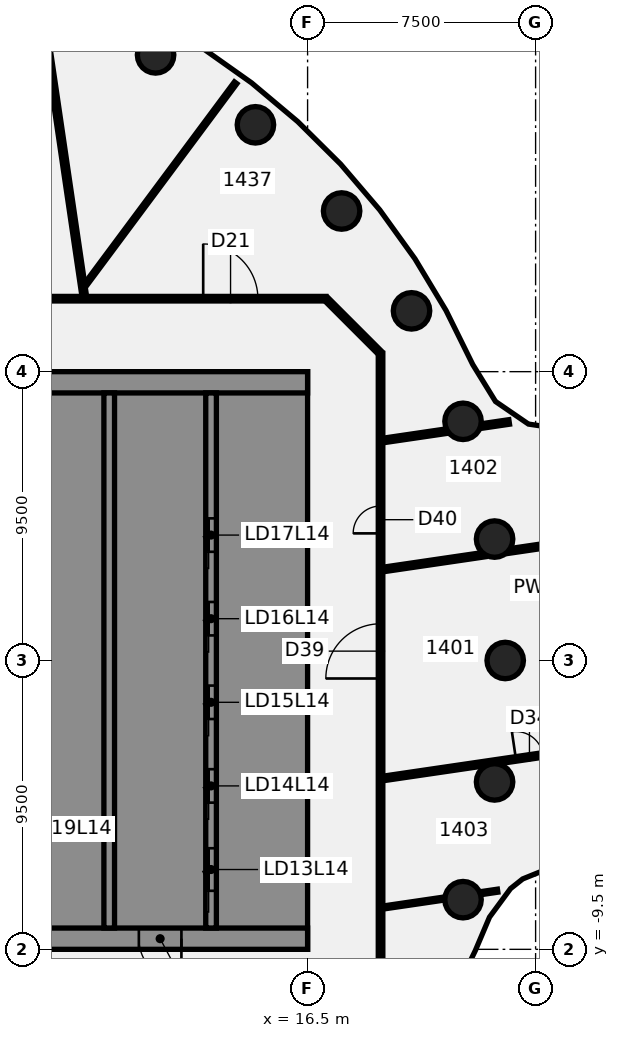
"""IFC4 building model, lengths in metres.
Left out: names, types, materials, properties, quantities, classifications, styles, units other than length and angle.
Written with IfcOpenShell. Run it as: python <this file> out.ifc"""

import sys

from ifc_helpers import new_model, si_unit, direction, frame, frame_2d, origin, origin_2d, place, context, subcontext, project, spatial, polyline, rectangle, circle, outline, extrude, element, fill, save


model = new_model("IFC4")
c1 = context("Model", 3, precision=1e-05, world=origin(), true_north=direction((0.0, 1.0)))
c2 = subcontext(c1, "Body", "Model", "MODEL_VIEW")
j1 = project(units=[si_unit("LENGTHUNIT", "METRE"), si_unit("PLANEANGLEUNIT", "RADIAN")], contexts=[c1])
p1 = place(None, origin())
s1 = spatial("IfcSite", under=j1, at=p1, CompositionType="ELEMENT")
p2 = place(p1, origin())
s2 = spatial("IfcBuilding", under=s1, at=p2, CompositionType="ELEMENT")
p3 = place(p2, frame((0.0, 0.0, 64.0)))
s3 = spatial("IfcBuildingStorey", under=s2, at=p3, CompositionType="ELEMENT", Elevation=64.0)
for number, where, z_axis, x_axis in (
    (1, (23.0, 0.0, -0.14), (0.0, 0.0, 1.0), (1.0, 0.0, 0.0)),
    (2, (22.651, 3.994, -0.14), (0.0, 0.0, 1.0), (1.0, 0.0, 0.0)),
    (3, (21.613, 7.866, -0.14), (0.0, 0.0, 1.0), (1.0, 0.0, 0.0)),
    (4, (19.919, 11.5, -0.14), (0.0, 0.0, 1.0), (1.0, 0.0, 0.0)),
    (5, (17.619, 14.784, -0.14), (0.0, 0.0, 1.0), (1.0, 0.0, 0.0)),
    (6, (14.784, 17.619, -0.14), (0.0, 0.0, 1.0), (1.0, 0.0, 0.0)),
    (7, (11.5, 19.919, -0.14), (0.0, 0.0, 1.0), (1.0, 0.0, 0.0)),
    (8, (21.613, -7.866, -0.14), (0.0, 0.0, 1.0), (1.0, 0.0, 0.0)),
    (9, (22.651, -3.994, -0.14), (0.0, 0.0, 1.0), (1.0, 0.0, 0.0)),
):
    element("IfcColumn", number, at=place(p3, frame(where, z_axis=z_axis, x_axis=x_axis)), inside=s3, PredefinedType="COLUMN", context=c2, shape_type="SweptSolid", body=[
        extrude(circle(Radius=0.6, at=origin_2d()), origin(), (0.0, 0.0, 1.0), 3.75),
    ])
p4 = place(p3, frame((7.826, 21.014, 0.0), z_axis=(0.0, 0.0, 1.0), x_axis=(0.145417104169, -0.989370439125, 0.0)))
e10 = element("IfcWall", 10, at=p4, inside=s3, PredefinedType="PARTITIONING", context=c2, shape_type="SweptSolid", body=[
    extrude(rectangle(XDim=9.142, YDim=0.15, at=frame_2d((4.571, 0.0))), origin(), (0.0, 0.0, 1.0), 3.01),
])
p5 = place(p3, frame((17.128, 11.872, 0.0), z_axis=(0.0, 0.0, 1.0), x_axis=(0.707106781187, -0.707106781187, 0.0)))
e11 = element("IfcWall", 11, at=p5, inside=s3, PredefinedType="PARTITIONING", context=c2, shape_type="SweptSolid", body=[
    extrude(rectangle(XDim=2.465, YDim=0.15, at=frame_2d((1.232, 0.0))), origin(), (0.0, 0.0, 1.0), 3.01),
])
p6 = place(p3, frame((-17.065, 11.9, 0.0), z_axis=(0.0, 0.0, 1.0), x_axis=(1.0, 0.0, 0.0)))
e12 = element("IfcWall", 12, at=p6, inside=s3, PredefinedType="PARTITIONING", context=c2, shape_type="SweptSolid", body=[
    extrude(rectangle(XDim=34.165, YDim=0.15, at=frame_2d((17.083, 0.0))), origin(), (0.0, 0.0, 1.0), 3.01),
])
p7 = place(p6, frame((17.662, 0.0, 0.0)))
e13 = element("IfcOpeningElement", 13, at=p7, cuts=e12, PredefinedType="OPENING", context=c2, shape_type="SweptSolid", body=[
    extrude(rectangle(XDim=1.8, YDim=2.1, at=frame_2d((0.9, 1.05))), frame((0.0, 0.085, 0.0), z_axis=(0.0, -1.0, 0.0), x_axis=(1.0, 0.0, 0.0)), (0.0, 0.0, 1.0), 0.17),
])
p8 = place(p6, frame((30.131, 0.0, 0.0)))
e14 = element("IfcOpeningElement", 14, at=p8, cuts=e12, PredefinedType="OPENING", context=c2, shape_type="SweptSolid", body=[
    extrude(rectangle(XDim=1.8, YDim=2.1, at=frame_2d((0.9, 1.05))), frame((0.0, 0.085, 0.0), z_axis=(0.0, -1.0, 0.0), x_axis=(1.0, 0.0, 0.0)), (0.0, 0.0, 1.0), 0.17),
])
p9 = place(p6, frame((5.116, 0.0, 0.0)))
e15 = element("IfcOpeningElement", 15, at=p9, cuts=e12, PredefinedType="OPENING", context=c2, shape_type="SweptSolid", body=[
    extrude(rectangle(XDim=1.8, YDim=2.1, at=frame_2d((0.9, 1.05))), frame((0.0, 0.085, 0.0), z_axis=(0.0, -1.0, 0.0), x_axis=(1.0, 0.0, 0.0)), (0.0, 0.0, 1.0), 0.17),
])
p10 = place(p3, frame((18.969, 7.234, 0.0), z_axis=(0.0, 0.0, 1.0), x_axis=(0.98937209659, 0.145405826875, 0.0)))
e16 = element("IfcWall", 16, at=p10, inside=s3, PredefinedType="PARTITIONING", context=c2, shape_type="SweptSolid", body=[
    extrude(rectangle(XDim=2.153, YDim=0.15, at=frame_2d((1.076, 0.0))), origin(), (0.0, 0.0, 1.0), 3.01),
])
p11 = place(p3, frame((22.18, 7.706, 0.0), z_axis=(0.0, 0.0, 1.0), x_axis=(0.989393512595, 0.145260033163, 0.0)))
e17 = element("IfcWall", 17, at=p11, inside=s3, PredefinedType="PARTITIONING", context=c2, shape_type="SweptSolid", body=[
    extrude(rectangle(XDim=0.961, YDim=0.15, at=frame_2d((0.481, 0.0))), origin(), (0.0, 0.0, 1.0), 3.01),
])
p12 = place(p3, frame((18.969, -3.882, 0.0), z_axis=(0.0, 0.0, 1.0), x_axis=(0.989370952115, 0.145413613912, 0.0)))
e18 = element("IfcWall", 18, at=p12, inside=s3, PredefinedType="PARTITIONING", context=c2, shape_type="SweptSolid", body=[
    extrude(rectangle(XDim=7.258, YDim=0.15, at=frame_2d((3.629, 0.0))), origin(), (0.0, 0.0, 1.0), 3.01),
])
p13 = place(p12, frame((4.43, 0.0, 0.0)))
e19 = element("IfcOpeningElement", 19, at=p13, cuts=e18, PredefinedType="OPENING", context=c2, shape_type="SweptSolid", body=[
    extrude(rectangle(XDim=0.9, YDim=2.1, at=frame_2d((0.45, 1.05))), frame((0.0, 0.085, 0.0), z_axis=(0.0, -1.0, 0.0), x_axis=(1.0, 0.0, 0.0)), (0.0, 0.0, 1.0), 0.17),
])
p14 = place(p3, frame((18.969, 2.991, 0.0), z_axis=(0.0, 0.0, 1.0), x_axis=(0.989385008204, 0.145317946381, 0.0)))
e20 = element("IfcWall", 20, at=p14, inside=s3, PredefinedType="PARTITIONING", context=c2, shape_type="SweptSolid", body=[
    extrude(rectangle(XDim=3.394, YDim=0.15, at=frame_2d((1.697, 0.0))), origin(), (0.0, 0.0, 1.0), 3.01),
])
p15 = place(p3, frame((23.086, 3.596, 0.0), z_axis=(0.0, 0.0, 1.0), x_axis=(0.98937731598, 0.145370308603, 0.0)))
e21 = element("IfcWall", 21, at=p15, inside=s3, PredefinedType="PARTITIONING", context=c2, shape_type="SweptSolid", body=[
    extrude(rectangle(XDim=2.103, YDim=0.15, at=frame_2d((1.051, 0.0))), origin(), (0.0, 0.0, 1.0), 3.01),
])
p16 = place(p3, frame((18.964, -8.128, 0.0), z_axis=(0.0, 0.0, 1.0), x_axis=(0.989366120347, 0.145446484692, 0.0)))
e22 = element("IfcWall", 22, at=p16, inside=s3, PredefinedType="PARTITIONING", context=c2, shape_type="SweptSolid", body=[
    extrude(rectangle(XDim=2.071, YDim=0.1, at=frame_2d((1.036, 0.0))), origin(), (0.0, 0.0, 1.0), 3.01),
])
p17 = place(p3, frame((22.167, -7.657, 0.0), z_axis=(0.0, 0.0, 1.0), x_axis=(0.98935388362, 0.145529697883, 0.0)))
e23 = element("IfcWall", 23, at=p17, inside=s3, PredefinedType="PARTITIONING", context=c2, shape_type="SweptSolid", body=[
    extrude(rectangle(XDim=0.591, YDim=0.1, at=frame_2d((0.295, 0.0))), origin(), (0.0, 0.0, 1.0), 3.01),
])
p18 = place(p3, frame((9.195, 12.361, 0.0), z_axis=(0.0, 0.0, 1.0), x_axis=(0.596808955644, 0.80238336876, 0.0)))
e24 = element("IfcWall", 24, at=p18, inside=s3, PredefinedType="PARTITIONING", context=c2, shape_type="SweptSolid", body=[
    extrude(rectangle(XDim=8.275, YDim=0.1, at=frame_2d((4.138, 0.0))), origin(), (0.0, 0.0, 1.0), 3.01),
])
p19 = place(p3, frame((18.9, -10.1, 0.0), z_axis=(0.0, 0.0, 1.0), x_axis=(0.0, 1.0, 0.0)))
e25 = element("IfcWall", 25, at=p19, inside=s3, PredefinedType="PARTITIONING", context=c2, shape_type="SweptSolid", body=[
    extrude(rectangle(XDim=20.2, YDim=0.15, at=frame_2d((10.1, 0.0))), origin(), (0.0, 0.0, 1.0), 3.01),
])
p20 = place(p19, frame((9.508, 0.0, 0.0)))
e26 = element("IfcOpeningElement", 26, at=p20, cuts=e25, PredefinedType="OPENING", context=c2, shape_type="SweptSolid", body=[
    extrude(rectangle(XDim=1.8, YDim=2.1, at=frame_2d((0.9, 1.05))), frame((0.0, 0.085, 0.0), z_axis=(0.0, -1.0, 0.0), x_axis=(1.0, 0.0, 0.0)), (0.0, 0.0, 1.0), 0.17),
])
p21 = place(p19, frame((14.281, 0.0, 0.0)))
e27 = element("IfcOpeningElement", 27, at=p21, cuts=e25, PredefinedType="OPENING", context=c2, shape_type="SweptSolid", body=[
    extrude(rectangle(XDim=0.9, YDim=2.1, at=frame_2d((0.45, 1.05))), frame((0.0, 0.085, 0.0), z_axis=(0.0, -1.0, 0.0), x_axis=(1.0, 0.0, 0.0)), (0.0, 0.0, 1.0), 0.17),
])
p22 = place(p3, frame((16.5, -9.15, 0.0), z_axis=(0.0, 0.0, 1.0), x_axis=(-1.0, 0.0, 0.0)))
e28 = element("IfcWall", 28, at=p22, inside=s3, PredefinedType="SHEAR", context=c2, shape_type="SweptSolid", body=[
    extrude(rectangle(XDim=13.0, YDim=0.7, at=frame_2d((6.5, 0.0))), origin(), (0.0, 0.0, 1.0), 3.61),
])
p23 = place(p22, frame((4.15, 0.0, 0.0)))
e29 = element("IfcOpeningElement", 29, at=p23, cuts=e28, PredefinedType="OPENING", context=c2, shape_type="SweptSolid", body=[
    extrude(rectangle(XDim=1.4, YDim=2.1, at=frame_2d((0.7, 1.05))), frame((0.0, 0.36, 0.0), z_axis=(0.0, -1.0, 0.0), x_axis=(1.0, 0.0, 0.0)), (0.0, 0.0, 1.0), 0.72),
])
p24 = place(p22, frame((10.125, 0.0, 0.0)))
e30 = element("IfcOpeningElement", 30, at=p24, cuts=e28, PredefinedType="OPENING", context=c2, shape_type="SweptSolid", body=[
    extrude(rectangle(XDim=1.4, YDim=2.1, at=frame_2d((0.7, 1.05))), frame((0.0, 0.36, 0.0), z_axis=(0.0, -1.0, 0.0), x_axis=(1.0, 0.0, 0.0)), (0.0, 0.0, 1.0), 0.72),
])
p25 = place(p3, origin())
e31 = element("IfcWall", 31, at=p25, inside=s3, PredefinedType="SHEAR", context=c2, shape_type="SweptSolid", body=[
    extrude(outline(polyline([(13.5, -8.8), (15.8, -8.8), (16.5, -8.8), (16.5, 8.8), (15.8, 8.8), (13.5, 8.8), (13.5, 8.125), (15.8, 8.125), (15.8, 5.625), (13.5, 5.625), (13.5, 5.375), (15.8, 5.375), (15.8, 2.875), (13.5, 2.875), (13.5, 2.625), (15.8, 2.625), (15.8, 0.125), (13.5, 0.125), (13.5, -0.125), (15.8, -0.125), (15.8, -2.625), (13.5, -2.625), (13.5, -2.875), (15.8, -2.875), (15.8, -5.375), (13.5, -5.375), (13.5, -5.625), (15.8, -5.625), (15.8, -8.125), (13.5, -8.125), (13.5, -8.8)])), origin(), (0.0, 0.0, 1.0), 3.61),
])
p26 = place(p3, frame((16.5, 9.15, 0.0), z_axis=(0.0, 0.0, 1.0), x_axis=(-1.0, 0.0, 0.0)))
e32 = element("IfcWall", 32, at=p26, inside=s3, PredefinedType="SHEAR", context=c2, shape_type="SweptSolid", body=[
    extrude(rectangle(XDim=13.0, YDim=0.7, at=frame_2d((6.5, 0.0))), origin(), (0.0, 0.0, 1.0), 3.61),
])
p27 = place(p3, origin())
e33 = element("IfcWall", 33, at=p27, inside=s3, PredefinedType="SHEAR", context=c2, shape_type="SweptSolid", body=[
    extrude(outline(polyline([(9.8, -5.375), (7.5, -5.375), (7.5, -2.875), (9.8, -2.875), (9.8, -2.625), (7.5, -2.625), (7.5, -0.125), (9.8, -0.125), (9.8, 0.125), (7.5, 0.125), (7.5, 2.625), (9.8, 2.625), (9.8, 2.875), (7.5, 2.875), (7.5, 5.375), (9.8, 5.375), (9.8, 5.625), (7.5, 5.625), (7.5, 8.125), (9.8, 8.125), (9.8, 8.8), (7.5, 8.8), (7.15, 8.8), (7.15, -5.625), (7.5, -5.625), (9.8, -5.625), (9.8, -5.375)])), origin(), (0.0, 0.0, 1.0), 3.61),
])
p28 = place(p3, origin())
e34 = element("IfcWall", 34, at=p28, inside=s3, PredefinedType="SHEAR", context=c2, shape_type="SweptSolid", body=[
    extrude(outline(polyline([(7.5, -8.125), (7.5, -8.8), (9.8, -8.8), (9.8, -8.125), (9.8, -5.625), (9.55, -5.625), (9.55, -8.125), (7.5, -8.125)])), origin(), (0.0, 0.0, 1.0), 3.61),
])
p29 = place(p3, frame((13.325, -8.8, 0.0), z_axis=(0.0, 0.0, 1.0), x_axis=(0.0, 1.0, 0.0)))
e35 = element("IfcWall", 35, at=p29, inside=s3, PredefinedType="SHEAR", context=c2, shape_type="SweptSolid", body=[
    extrude(rectangle(XDim=17.6, YDim=0.35, at=frame_2d((8.8, 0.0))), origin(), (0.0, 0.0, 1.0), 3.61),
])
p30 = place(p29, frame((1.225, 0.0, 0.0)))
e36 = element("IfcOpeningElement", 36, at=p30, cuts=e35, PredefinedType="OPENING", context=c2, shape_type="SweptSolid", body=[
    extrude(rectangle(XDim=1.4, YDim=2.1, at=frame_2d((0.7, 1.05))), frame((0.0, 0.185, 0.0), z_axis=(0.0, -1.0, 0.0), x_axis=(1.0, 0.0, 0.0)), (0.0, 0.0, 1.0), 0.37),
])
p31 = place(p29, frame((4.125, 0.0, 0.0)))
e37 = element("IfcOpeningElement", 37, at=p31, cuts=e35, PredefinedType="OPENING", context=c2, shape_type="SweptSolid", body=[
    extrude(rectangle(XDim=1.1, YDim=2.1, at=frame_2d((0.55, 1.05))), frame((0.0, 0.185, 0.0), z_axis=(0.0, -1.0, 0.0), x_axis=(1.0, 0.0, 0.0)), (0.0, 0.0, 1.0), 0.37),
])
p32 = place(p29, frame((6.875, 0.0, 0.0)))
e38 = element("IfcOpeningElement", 38, at=p32, cuts=e35, PredefinedType="OPENING", context=c2, shape_type="SweptSolid", body=[
    extrude(rectangle(XDim=1.1, YDim=2.1, at=frame_2d((0.55, 1.05))), frame((0.0, 0.185, 0.0), z_axis=(0.0, -1.0, 0.0), x_axis=(1.0, 0.0, 0.0)), (0.0, 0.0, 1.0), 0.37),
])
p33 = place(p29, frame((9.625, 0.0, 0.0)))
e39 = element("IfcOpeningElement", 39, at=p33, cuts=e35, PredefinedType="OPENING", context=c2, shape_type="SweptSolid", body=[
    extrude(rectangle(XDim=1.1, YDim=2.1, at=frame_2d((0.55, 1.05))), frame((0.0, 0.185, 0.0), z_axis=(0.0, -1.0, 0.0), x_axis=(1.0, 0.0, 0.0)), (0.0, 0.0, 1.0), 0.37),
])
p34 = place(p29, frame((12.375, 0.0, 0.0)))
e40 = element("IfcOpeningElement", 40, at=p34, cuts=e35, PredefinedType="OPENING", context=c2, shape_type="SweptSolid", body=[
    extrude(rectangle(XDim=1.1, YDim=2.1, at=frame_2d((0.55, 1.05))), frame((0.0, 0.185, 0.0), z_axis=(0.0, -1.0, 0.0), x_axis=(1.0, 0.0, 0.0)), (0.0, 0.0, 1.0), 0.37),
])
p35 = place(p3, frame((9.975, -8.8, 0.0), z_axis=(0.0, 0.0, 1.0), x_axis=(0.0, 1.0, 0.0)))
e41 = element("IfcWall", 41, at=p35, inside=s3, PredefinedType="SHEAR", context=c2, shape_type="SweptSolid", body=[
    extrude(rectangle(XDim=17.6, YDim=0.35, at=frame_2d((8.8, 0.0))), origin(), (0.0, 0.0, 1.0), 3.61),
])
p36 = place(p8, origin())
e42 = element("IfcDoor", 42, at=p36, inside=s3, OperationType="DOUBLE_DOOR_SINGLE_SWING", PredefinedType="DOOR", context=c2, shape_type="SweptSolid", body=[
    extrude(rectangle(XDim=1.8, YDim=2.1, at=frame_2d((0.9, 1.05))), frame((0.0, 0.025, 0.0), z_axis=(0.0, -1.0, 0.0), x_axis=(1.0, 0.0, 0.0)), (0.0, 0.0, 1.0), 0.05),
])
fill(e14, e42)
p37 = place(p13, frame((0.9, 0.0, 0.0), z_axis=(0.0, 0.0, 1.0), x_axis=(-1.0, 0.0, 0.0)))
e43 = element("IfcDoor", 43, at=p37, inside=s3, OperationType="SINGLE_SWING_RIGHT", PredefinedType="DOOR", context=c2, shape_type="SweptSolid", body=[
    extrude(rectangle(XDim=0.9, YDim=2.1, at=frame_2d((0.45, 1.05))), frame((0.0, 0.025, 0.0), z_axis=(0.0, -1.0, 0.0), x_axis=(1.0, 0.0, 0.0)), (0.0, 0.0, 1.0), 0.05),
])
fill(e19, e43)
p38 = place(p20, origin())
e44 = element("IfcDoor", 44, at=p38, inside=s3, OperationType="DOUBLE_DOOR_SINGLE_SWING", PredefinedType="DOOR", context=c2, shape_type="SweptSolid", body=[
    extrude(rectangle(XDim=1.8, YDim=2.1, at=frame_2d((0.9, 1.05))), frame((0.0, 0.025, 0.0), z_axis=(0.0, -1.0, 0.0), x_axis=(1.0, 0.0, 0.0)), (0.0, 0.0, 1.0), 0.05),
])
fill(e26, e44)
p39 = place(p21, frame((0.9, 0.0, 0.0), z_axis=(0.0, 0.0, 1.0), x_axis=(-1.0, 0.0, 0.0)))
e45 = element("IfcDoor", 45, at=p39, inside=s3, OperationType="SINGLE_SWING_RIGHT", PredefinedType="DOOR", context=c2, shape_type="SweptSolid", body=[
    extrude(rectangle(XDim=0.9, YDim=2.1, at=frame_2d((0.45, 1.05))), frame((0.0, 0.025, 0.0), z_axis=(0.0, -1.0, 0.0), x_axis=(1.0, 0.0, 0.0)), (0.0, 0.0, 1.0), 0.05),
])
fill(e27, e45)
p40 = place(p23, origin())
e46 = element("IfcDoor", 46, at=p40, inside=s3, OperationType="SINGLE_SWING_LEFT", PredefinedType="DOOR", context=c2, shape_type="SweptSolid", body=[
    extrude(rectangle(XDim=1.4, YDim=2.1, at=frame_2d((0.7, 1.05))), frame((0.0, 0.025, 0.0), z_axis=(0.0, -1.0, 0.0), x_axis=(1.0, 0.0, 0.0)), (0.0, 0.0, 1.0), 0.05),
])
fill(e29, e46)
p41 = place(p30, origin())
e47 = element("IfcDoor", 47, at=p41, inside=s3, OperationType="SLIDING_TO_LEFT", PredefinedType="DOOR", context=c2, shape_type="SweptSolid", body=[
    extrude(rectangle(XDim=1.4, YDim=2.1, at=frame_2d((0.7, 1.05))), frame((0.0, 0.025, 0.0), z_axis=(0.0, -1.0, 0.0), x_axis=(1.0, 0.0, 0.0)), (0.0, 0.0, 1.0), 0.05),
])
fill(e36, e47)
p42 = place(p31, origin())
e48 = element("IfcDoor", 48, at=p42, inside=s3, OperationType="SLIDING_TO_LEFT", PredefinedType="DOOR", context=c2, shape_type="SweptSolid", body=[
    extrude(rectangle(XDim=1.1, YDim=2.1, at=frame_2d((0.55, 1.05))), frame((0.0, 0.025, 0.0), z_axis=(0.0, -1.0, 0.0), x_axis=(1.0, 0.0, 0.0)), (0.0, 0.0, 1.0), 0.05),
])
fill(e37, e48)
p43 = place(p32, origin())
e49 = element("IfcDoor", 49, at=p43, inside=s3, OperationType="SLIDING_TO_LEFT", PredefinedType="DOOR", context=c2, shape_type="SweptSolid", body=[
    extrude(rectangle(XDim=1.1, YDim=2.1, at=frame_2d((0.55, 1.05))), frame((0.0, 0.025, 0.0), z_axis=(0.0, -1.0, 0.0), x_axis=(1.0, 0.0, 0.0)), (0.0, 0.0, 1.0), 0.05),
])
fill(e38, e49)
p44 = place(p33, origin())
e50 = element("IfcDoor", 50, at=p44, inside=s3, OperationType="SLIDING_TO_LEFT", PredefinedType="DOOR", context=c2, shape_type="SweptSolid", body=[
    extrude(rectangle(XDim=1.1, YDim=2.1, at=frame_2d((0.55, 1.05))), frame((0.0, 0.025, 0.0), z_axis=(0.0, -1.0, 0.0), x_axis=(1.0, 0.0, 0.0)), (0.0, 0.0, 1.0), 0.05),
])
fill(e39, e50)
p45 = place(p34, origin())
e51 = element("IfcDoor", 51, at=p45, inside=s3, OperationType="SLIDING_TO_LEFT", PredefinedType="DOOR", context=c2, shape_type="SweptSolid", body=[
    extrude(rectangle(XDim=1.1, YDim=2.1, at=frame_2d((0.55, 1.05))), frame((0.0, 0.025, 0.0), z_axis=(0.0, -1.0, 0.0), x_axis=(1.0, 0.0, 0.0)), (0.0, 0.0, 1.0), 0.05),
])
fill(e40, e51)
save(model, sys.argv[1])
